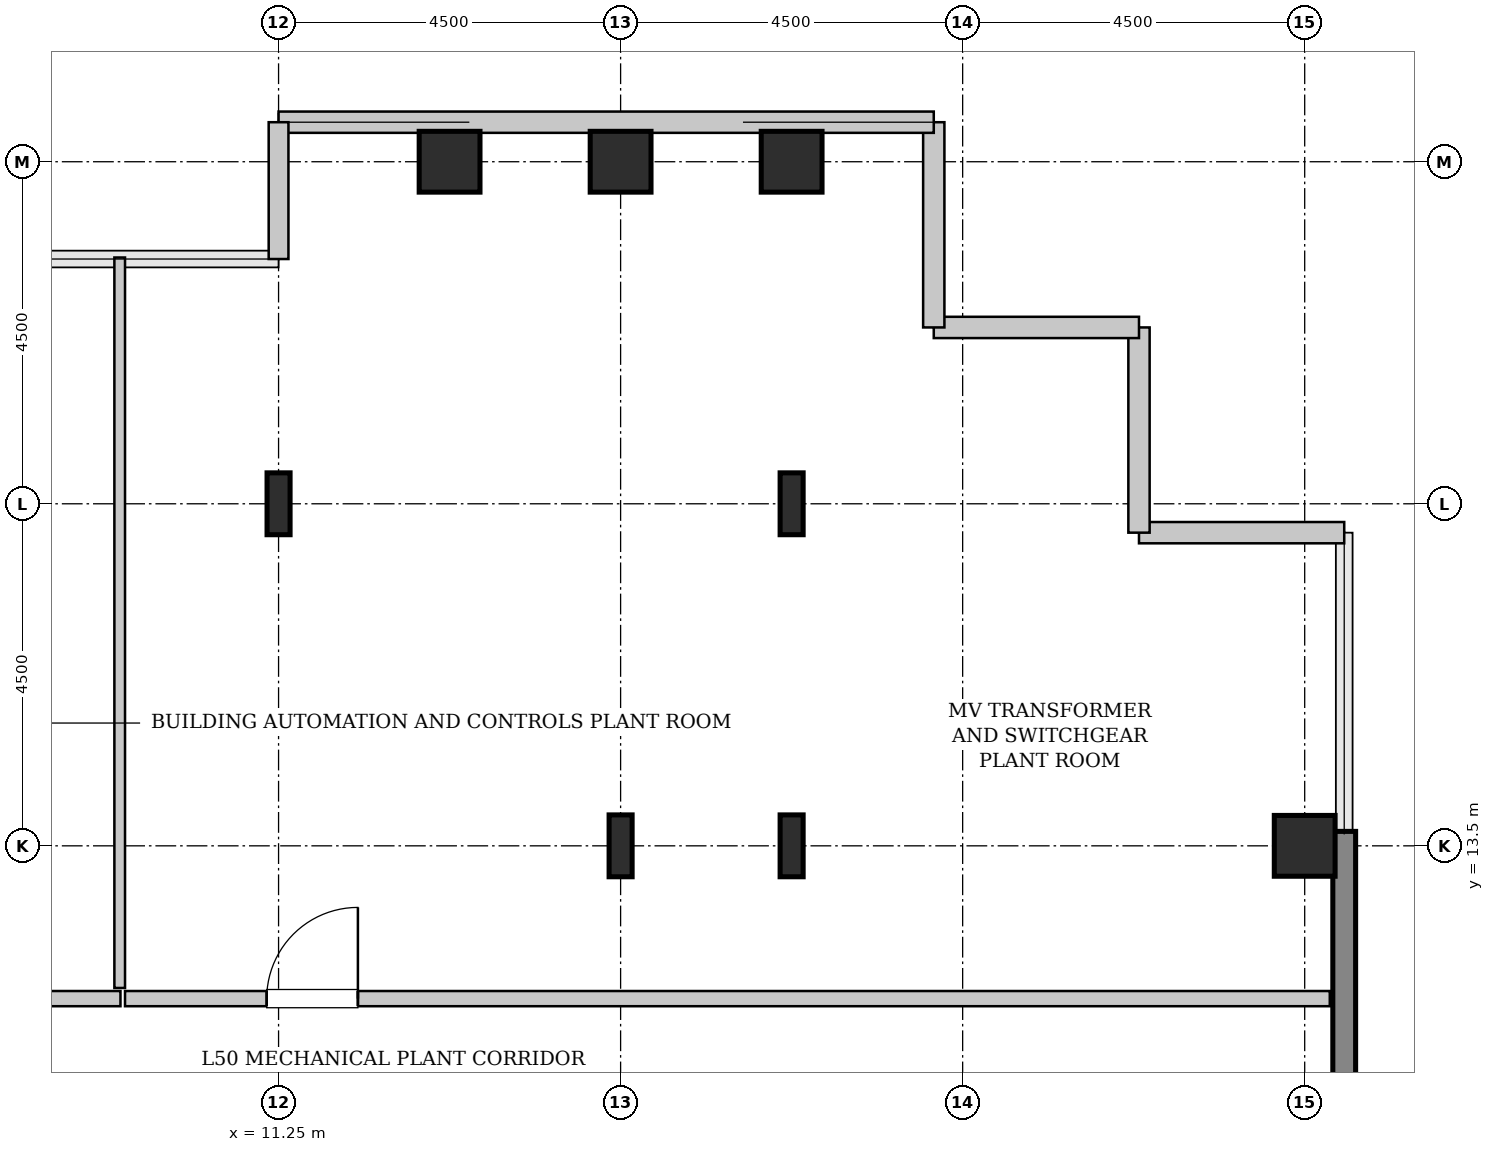
"""IFC4 building model, lengths in metres.
Left out: names, types, materials, properties, quantities, classifications, styles, units other than length and angle.
Written with IfcOpenShell. Run it as: python <this file> out.ifc"""

import sys

from ifc_helpers import new_model, si_unit, direction, frame, frame_2d, origin, origin_2d, place, context, subcontext, project, spatial, rectangle, hollow_rectangle, i_section, extrude, source, transform, mapped, element, fill, save


model = new_model("IFC4")
c1 = context("Model", 3, precision=1e-05, world=origin(), true_north=direction((0.0, 1.0)))
c2 = subcontext(c1, "Body", "Model", "MODEL_VIEW")
j1 = project(units=[si_unit("LENGTHUNIT", "METRE"), si_unit("PLANEANGLEUNIT", "RADIAN")], contexts=[c1])
p1 = place(None, origin())
s1 = spatial("IfcSite", under=j1, at=p1, CompositionType="ELEMENT")
p2 = place(p1, origin())
s2 = spatial("IfcBuilding", under=s1, at=p2, CompositionType="ELEMENT")
p3 = place(p2, frame((0.0, 0.0, 202.0)))
s3 = spatial("IfcBuildingStorey", under=s2, at=p3, CompositionType="ELEMENT", Elevation=202.0)
m1 = source(origin(), c2, "Body", "SweptSolid", [
    extrude(i_section(OverallWidth=0.303, OverallDepth=0.814, WebThickness=0.021, FlangeThickness=0.04, FilletRadius=0.03, at=origin_2d()), origin(), (0.0, 0.0, 1.0), 4.6),
])
p4 = place(p3, frame((11.25, 18.0, 0.0), z_axis=(0.0, 0.0, 1.0), x_axis=(1.0, 0.0, 0.0)))
e1 = element("IfcColumn", 1, at=p4, inside=s3, PredefinedType="COLUMN", context=c2, shape_type="MappedRepresentation", body=[
    mapped(m1, transform((0.0, 0.0, 0.0), x_axis=(1.0, 0.0, 0.0), y_axis=(0.0, 1.0, 0.0), z_axis=(0.0, 0.0, 1.0), scale=1.0)),
])
m2 = source(origin(), c2, "Body", "SweptSolid", [
    extrude(hollow_rectangle(XDim=0.8, YDim=0.8, WallThickness=0.04, InnerFilletRadius=0.04, OuterFilletRadius=0.08, at=origin_2d()), origin(), (0.0, 0.0, 1.0), 4.6),
])
p5 = place(p3, frame((13.5, 22.5, 0.0), z_axis=(0.0, 0.0, 1.0), x_axis=(1.0, 0.0, 0.0)))
e2 = element("IfcColumn", 2, at=p5, inside=s3, PredefinedType="COLUMN", context=c2, shape_type="MappedRepresentation", body=[
    mapped(m2, transform((0.0, 0.0, 0.0), x_axis=(1.0, 0.0, 0.0), y_axis=(0.0, 1.0, 0.0), z_axis=(0.0, 0.0, 1.0), scale=1.0)),
])
p6 = place(p3, frame((15.75, 13.5, 0.0), z_axis=(0.0, 0.0, 1.0), x_axis=(1.0, 0.0, 0.0)))
e3 = element("IfcColumn", 3, at=p6, inside=s3, PredefinedType="COLUMN", context=c2, shape_type="MappedRepresentation", body=[
    mapped(m1, transform((0.0, 0.0, 0.0), x_axis=(1.0, 0.0, 0.0), y_axis=(0.0, 1.0, 0.0), z_axis=(0.0, 0.0, 1.0), scale=1.0)),
])
p7 = place(p3, frame((15.75, 22.5, 0.0), z_axis=(0.0, 0.0, 1.0), x_axis=(1.0, 0.0, 0.0)))
e4 = element("IfcColumn", 4, at=p7, inside=s3, PredefinedType="COLUMN", context=c2, shape_type="MappedRepresentation", body=[
    mapped(m2, transform((0.0, 0.0, 0.0), x_axis=(1.0, 0.0, 0.0), y_axis=(0.0, 1.0, 0.0), z_axis=(0.0, 0.0, 1.0), scale=1.0)),
])
for number, where, z_axis, x_axis in (
    (5, (18.0, 13.5, 0.0), (0.0, 0.0, 1.0), (1.0, 0.0, 0.0)),
    (6, (18.0, 18.0, 0.0), (0.0, 0.0, 1.0), (1.0, 0.0, 0.0)),
):
    element("IfcColumn", number, at=place(p3, frame(where, z_axis=z_axis, x_axis=x_axis)), inside=s3, PredefinedType="COLUMN", context=c2, shape_type="MappedRepresentation", body=[
        mapped(m1, transform((0.0, 0.0, 0.0), x_axis=(1.0, 0.0, 0.0), y_axis=(0.0, 1.0, 0.0), z_axis=(0.0, 0.0, 1.0), scale=1.0)),
    ])
for number, where, z_axis, x_axis in (
    (7, (18.0, 22.5, 0.0), (0.0, 0.0, 1.0), (1.0, 0.0, 0.0)),
    (8, (24.75, 13.5, 0.0), (0.0, 0.0, 1.0), (1.0, 0.0, 0.0)),
):
    element("IfcColumn", number, at=place(p3, frame(where, z_axis=z_axis, x_axis=x_axis)), inside=s3, PredefinedType="COLUMN", context=c2, shape_type="MappedRepresentation", body=[
        mapped(m2, transform((0.0, 0.0, 0.0), x_axis=(1.0, 0.0, 0.0), y_axis=(0.0, 1.0, 0.0), z_axis=(0.0, 0.0, 1.0), scale=1.0)),
    ])
m3 = source(origin(), c2, "Body", "SweptSolid", [
    extrude(rectangle(XDim=9.38, YDim=0.3, at=frame_2d((4.69, 0.0))), origin(), (0.0, 0.0, 1.0), 4.35),
])
p8 = place(p3, frame((25.27, 4.31, 0.0), z_axis=(0.0, 0.0, 1.0), x_axis=(0.0, 1.0, 0.0)))
e9 = element("IfcWall", 9, at=p8, inside=s3, PredefinedType="SHEAR", context=c2, shape_type="MappedRepresentation", body=[
    mapped(m3, transform((0.0, 0.0, 0.0), x_axis=(1.0, 0.0, 0.0), y_axis=(0.0, 1.0, 0.0), z_axis=(0.0, 0.0, 1.0), scale=1.0)),
])
m4 = source(origin(), c2, "Body", "SweptSolid", [
    extrude(rectangle(XDim=2.7, YDim=0.28, at=frame_2d((1.35, 0.0))), origin(), (0.0, 0.0, 1.0), 4.35),
])
for number, where, z_axis, x_axis in (
    (10, (25.27, 17.62, 0.0), (0.0, 0.0, 1.0), (-1.0, 0.0, 0.0)),
    (11, (22.57, 17.62, 0.0), (0.0, 0.0, 1.0), (0.0, 1.0, 0.0)),
    (12, (22.57, 20.32, 0.0), (0.0, 0.0, 1.0), (-1.0, 0.0, 0.0)),
    (13, (19.87, 20.32, 0.0), (0.0, 0.0, 1.0), (0.0, 1.0, 0.0)),
):
    element("IfcWall", number, at=place(p3, frame(where, z_axis=z_axis, x_axis=x_axis)), inside=s3, PredefinedType="SOLIDWALL", context=c2, shape_type="MappedRepresentation", body=[
        mapped(m4, transform((0.0, 0.0, 0.0), x_axis=(1.0, 0.0, 0.0), y_axis=(0.0, 1.0, 0.0), z_axis=(0.0, 0.0, 1.0), scale=1.0)),
    ])
m5 = source(origin(), c2, "Body", "SweptSolid", [
    extrude(rectangle(XDim=8.62, YDim=0.28, at=frame_2d((4.31, 0.0))), origin(), (0.0, 0.0, 1.0), 1.1),
])
p9 = place(p3, frame((19.87, 23.02, 0.0), z_axis=(0.0, 0.0, 1.0), x_axis=(-1.0, 0.0, 0.0)))
e14 = element("IfcWall", 14, at=p9, inside=s3, PredefinedType="SOLIDWALL", context=c2, shape_type="MappedRepresentation", body=[
    mapped(m5, transform((0.0, 0.0, 0.0), x_axis=(1.0, 0.0, 0.0), y_axis=(0.0, 1.0, 0.0), z_axis=(0.0, 0.0, 1.0), scale=1.0)),
])
m6 = source(origin(), c2, "Body", "SweptSolid", [
    extrude(rectangle(XDim=1.8, YDim=0.26, at=frame_2d((0.9, 0.0))), origin(), (0.0, 0.0, 1.0), 4.35),
])
p10 = place(p3, frame((11.25, 23.02, 0.0), z_axis=(0.0, 0.0, 1.0), x_axis=(0.0, -1.0, 0.0)))
e15 = element("IfcWall", 15, at=p10, inside=s3, PredefinedType="SOLIDWALL", context=c2, shape_type="MappedRepresentation", body=[
    mapped(m6, transform((0.0, 0.0, 0.0), x_axis=(1.0, 0.0, 0.0), y_axis=(0.0, 1.0, 0.0), z_axis=(0.0, 0.0, 1.0), scale=1.0)),
])
m7 = source(origin(), c2, "Body", "SweptSolid", [
    extrude(rectangle(XDim=4.54, YDim=0.2, at=frame_2d((2.27, 0.0))), origin(), (0.0, 0.0, 1.0), 4.335),
])
p11 = place(p3, frame((4.63, 11.49, 0.0), z_axis=(0.0, 0.0, 1.0), x_axis=(1.0, 0.0, 0.0)))
e16 = element("IfcWall", 16, at=p11, inside=s3, PredefinedType="SOLIDWALL", context=c2, shape_type="MappedRepresentation", body=[
    mapped(m7, transform((0.0, 0.0, 0.0), x_axis=(1.0, 0.0, 0.0), y_axis=(0.0, 1.0, 0.0), z_axis=(0.0, 0.0, 1.0), scale=1.0)),
])
p12 = place(p11, frame((1.67, 0.0, 0.0)))
e17 = element("IfcOpeningElement", 17, at=p12, cuts=e16, PredefinedType="OPENING", context=c2, shape_type="SweptSolid", body=[
    extrude(rectangle(XDim=1.2, YDim=2.15, at=frame_2d((0.6, 1.075))), frame((0.0, 0.11, 0.0), z_axis=(0.0, -1.0, 0.0), x_axis=(1.0, 0.0, 0.0)), (0.0, 0.0, 1.0), 0.22),
])
m8 = source(origin(), c2, "Body", "SweptSolid", [
    extrude(rectangle(XDim=9.61, YDim=0.14, at=frame_2d((4.805, 0.0))), origin(), (0.0, 0.0, 1.0), 4.335),
])
p13 = place(p3, frame((9.16, 11.63, 0.0), z_axis=(0.0, 0.0, 1.0), x_axis=(0.0, 1.0, 0.0)))
e18 = element("IfcWall", 18, at=p13, inside=s3, PredefinedType="PARTITIONING", context=c2, shape_type="MappedRepresentation", body=[
    mapped(m8, transform((0.0, 0.0, 0.0), x_axis=(1.0, 0.0, 0.0), y_axis=(0.0, 1.0, 0.0), z_axis=(0.0, 0.0, 1.0), scale=1.0)),
])
m9 = source(origin(), c2, "Body", "SweptSolid", [
    extrude(rectangle(XDim=15.85, YDim=0.2, at=frame_2d((7.925, 0.0))), origin(), (0.0, 0.0, 1.0), 4.335),
])
p14 = place(p3, frame((9.23, 11.49, 0.0), z_axis=(0.0, 0.0, 1.0), x_axis=(1.0, 0.0, 0.0)))
e19 = element("IfcWall", 19, at=p14, inside=s3, PredefinedType="SOLIDWALL", context=c2, shape_type="MappedRepresentation", body=[
    mapped(m9, transform((0.0, 0.0, 0.0), x_axis=(1.0, 0.0, 0.0), y_axis=(0.0, 1.0, 0.0), z_axis=(0.0, 0.0, 1.0), scale=1.0)),
])
p15 = place(p14, frame((1.864, 0.0, 0.0)))
e20 = element("IfcOpeningElement", 20, at=p15, cuts=e19, PredefinedType="OPENING", context=c2, shape_type="SweptSolid", body=[
    extrude(rectangle(XDim=1.2, YDim=2.15, at=frame_2d((0.6, 1.075))), frame((0.0, 0.11, 0.0), z_axis=(0.0, -1.0, 0.0), x_axis=(1.0, 0.0, 0.0)), (0.0, 0.0, 1.0), 0.22),
])
m10 = source(origin(), c2, "Body", "SweptSolid", [
    extrude(rectangle(XDim=1.2, YDim=2.15, at=frame_2d((0.6, 1.075))), frame((0.0, 0.025, 0.0), z_axis=(0.0, -1.0, 0.0), x_axis=(1.0, 0.0, 0.0)), (0.0, 0.0, 1.0), 0.05),
])
p16 = place(p15, origin())
e21 = element("IfcDoor", 21, at=p16, inside=s3, OperationType="SINGLE_SWING_RIGHT", PredefinedType="DOOR", context=c2, shape_type="MappedRepresentation", body=[
    mapped(m10, transform((0.0, 0.0, 0.0), x_axis=(1.0, 0.0, 0.0), y_axis=(0.0, 1.0, 0.0), z_axis=(0.0, 0.0, 1.0), scale=1.0)),
])
fill(e20, e21)
save(model, sys.argv[1])
